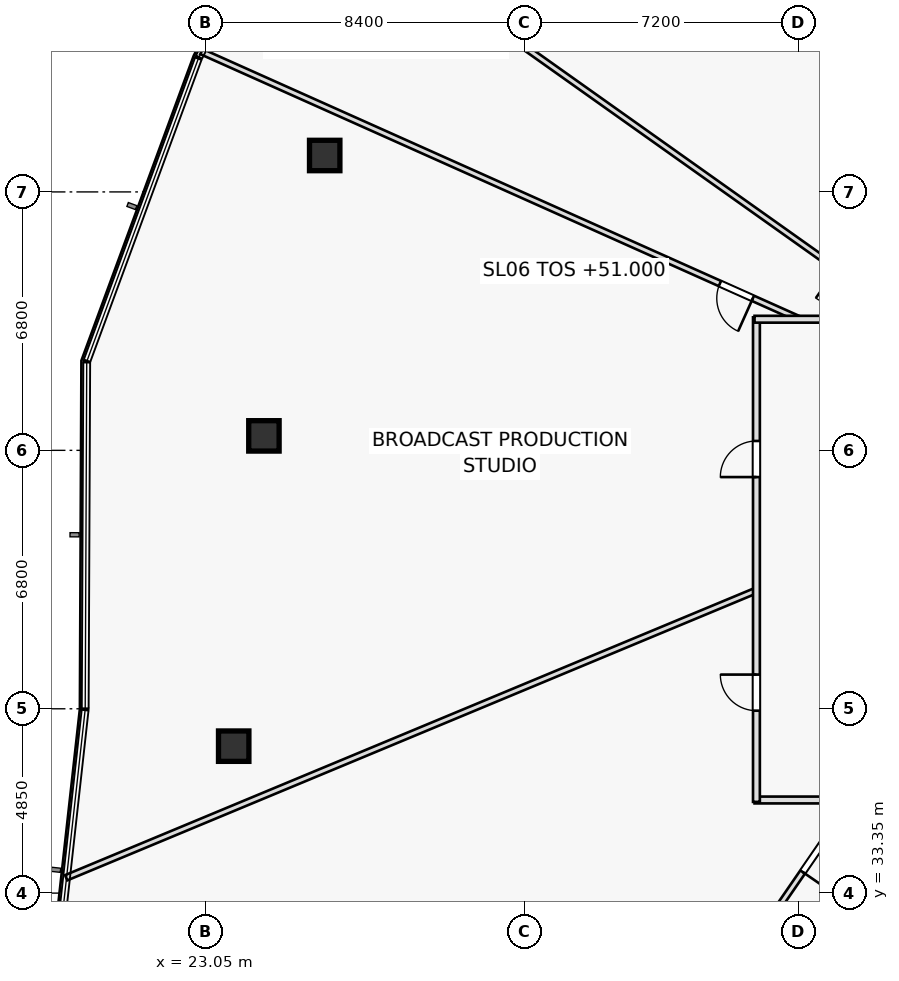
"""IFC4 building model, lengths in metres.
Left out: names, types, materials, properties, quantities, classifications, styles, units other than length and angle.
Written with IfcOpenShell. Run it as: python <this file> out.ifc"""

import sys

from ifc_helpers import new_model, si_unit, direction, frame, frame_2d, origin, origin_2d, place, context, subcontext, project, spatial, rectangle, hollow_rectangle, extrude, element, fill, save


model = new_model("IFC4")
c1 = context("Model", 3, precision=1e-05, world=origin(), true_north=direction((0.0, 1.0)))
c2 = subcontext(c1, "Body", "Model", "MODEL_VIEW")
j1 = project(units=[si_unit("LENGTHUNIT", "METRE"), si_unit("PLANEANGLEUNIT", "RADIAN")], contexts=[c1])
p1 = place(None, origin())
s1 = spatial("IfcSite", under=j1, at=p1, CompositionType="ELEMENT")
p2 = place(p1, origin())
s2 = spatial("IfcBuilding", under=s1, at=p2, CompositionType="ELEMENT")
p3 = place(p2, frame((0.0, 0.0, 51.0)))
s3 = spatial("IfcBuildingStorey", under=s2, at=p3, CompositionType="ELEMENT", Elevation=51.0)
for number, where, z_axis, x_axis in (
    (1, (26.189, 52.758, 0.0), (0.0, 0.0, 1.0), (1.0, 0.0, 0.0)),
    (2, (24.59, 45.381, 0.0), (0.0, 0.0, 1.0), (1.0, 0.0, 0.0)),
    (3, (23.795, 37.216, 0.0), (0.0, 0.0, 1.0), (1.0, 0.0, 0.0)),
):
    element("IfcColumn", number, at=place(p3, frame(where, z_axis=z_axis, x_axis=x_axis)), inside=s3, PredefinedType="COLUMN", context=c2, shape_type="SweptSolid", body=[
        extrude(hollow_rectangle(XDim=0.8, YDim=0.8, WallThickness=0.045, at=origin_2d()), origin(), (0.0, 0.0, 1.0), 3.6),
    ])
p4 = place(p3, frame((41.539, 48.45, 0.0), z_axis=(0.0, 0.0, 1.0), x_axis=(-0.81551552438, 0.578735198079, 0.0)))
e4 = element("IfcWall", 4, at=p4, inside=s3, PredefinedType="PARTITIONING", context=c2, shape_type="SweptSolid", body=[
    extrude(rectangle(XDim=19.961, YDim=0.15, at=frame_2d((9.98, 0.0))), origin(), (0.0, 0.0, 1.0), 2.925),
])
p5 = place(p4, frame((1.35, 0.0, 0.0)))
e5 = element("IfcOpeningElement", 5, at=p5, cuts=e4, PredefinedType="OPENING", context=c2, shape_type="SweptSolid", body=[
    extrude(rectangle(XDim=0.95, YDim=2.05, at=frame_2d((0.475, 1.025))), frame((0.0, 0.085, 0.0), z_axis=(0.0, -1.0, 0.0), x_axis=(1.0, 0.0, 0.0)), (0.0, 0.0, 1.0), 0.17),
])
p6 = place(p3, frame((38.688, 48.45, 0.0), z_axis=(0.0, 0.0, 1.0), x_axis=(-0.912816446659, 0.408370095269, 0.0)))
e6 = element("IfcWall", 6, at=p6, inside=s3, PredefinedType="PARTITIONING", context=c2, shape_type="SweptSolid", body=[
    extrude(rectangle(XDim=17.247, YDim=0.15, at=frame_2d((8.623, 0.0))), origin(), (0.0, 0.0, 1.0), 2.925),
])
p7 = place(p6, frame((1.35, 0.0, 0.0)))
e7 = element("IfcOpeningElement", 7, at=p7, cuts=e6, PredefinedType="OPENING", context=c2, shape_type="SweptSolid", body=[
    extrude(rectangle(XDim=0.95, YDim=2.05, at=frame_2d((0.475, 1.025))), frame((0.0, 0.085, 0.0), z_axis=(0.0, -1.0, 0.0), x_axis=(1.0, 0.0, 0.0)), (0.0, 0.0, 1.0), 0.17),
])
p8 = place(p3, frame((37.55, 41.316, 0.0), z_axis=(0.0, 0.0, 1.0), x_axis=(-0.923195824761, -0.384329896241, 0.0)))
e8 = element("IfcWall", 8, at=p8, inside=s3, PredefinedType="PARTITIONING", context=c2, shape_type="SweptSolid", body=[
    extrude(rectangle(XDim=19.675, YDim=0.15, at=frame_2d((9.838, 0.0))), origin(), (0.0, 0.0, 1.0), 2.925),
])
p9 = place(p3, frame((40.07, 35.8, 0.0), z_axis=(0.0, 0.0, 1.0), x_axis=(-0.566800354016, -0.823855180652, 0.0)))
e9 = element("IfcWall", 9, at=p9, inside=s3, PredefinedType="PARTITIONING", context=c2, shape_type="SweptSolid", body=[
    extrude(rectangle(XDim=16.75, YDim=0.15, at=frame_2d((8.375, 0.0))), origin(), (0.0, 0.0, 1.0), 2.975),
])
p10 = place(p9, frame((1.35, 0.0, 0.0)))
e10 = element("IfcOpeningElement", 10, at=p10, cuts=e9, PredefinedType="OPENING", context=c2, shape_type="SweptSolid", body=[
    extrude(rectangle(XDim=0.95, YDim=2.05, at=frame_2d((0.475, 1.025))), frame((0.0, 0.085, 0.0), z_axis=(0.0, -1.0, 0.0), x_axis=(1.0, 0.0, 0.0)), (0.0, 0.0, 1.0), 0.17),
])
p11 = place(p3, frame((41.795, 35.8, 0.0), z_axis=(0.0, 0.0, 1.0), x_axis=(-0.44763793032, -0.894214897739, 0.0)))
e11 = element("IfcWall", 11, at=p11, inside=s3, PredefinedType="PARTITIONING", context=c2, shape_type="SweptSolid", body=[
    extrude(rectangle(XDim=16.568, YDim=0.15, at=frame_2d((8.284, 0.0))), origin(), (0.0, 0.0, 1.0), 2.975),
])
p12 = place(p3, frame((59.65, 35.8, 0.0), z_axis=(0.0, 0.0, 1.0), x_axis=(-1.0, 0.0, 0.0)))
e12 = element("IfcWall", 12, at=p12, inside=s3, PredefinedType="PARTITIONING", context=c2, shape_type="SweptSolid", body=[
    extrude(rectangle(XDim=22.15, YDim=0.18, at=frame_2d((11.075, 0.0))), origin(), (0.0, 0.0, 1.0), 2.925),
])
p13 = place(p12, frame((2.493, 0.0, 0.0)))
e13 = element("IfcOpeningElement", 13, at=p13, cuts=e12, PredefinedType="OPENING", context=c2, shape_type="SweptSolid", body=[
    extrude(rectangle(XDim=0.95, YDim=2.05, at=frame_2d((0.475, 1.025))), frame((0.0, 0.1, 0.0), z_axis=(0.0, -1.0, 0.0), x_axis=(1.0, 0.0, 0.0)), (0.0, 0.0, 1.0), 0.2),
])
p14 = place(p12, frame((7.588, 0.0, 0.0)))
e14 = element("IfcOpeningElement", 14, at=p14, cuts=e12, PredefinedType="OPENING", context=c2, shape_type="SweptSolid", body=[
    extrude(rectangle(XDim=0.95, YDim=2.05, at=frame_2d((0.475, 1.025))), frame((0.0, 0.1, 0.0), z_axis=(0.0, -1.0, 0.0), x_axis=(1.0, 0.0, 0.0)), (0.0, 0.0, 1.0), 0.2),
])
p15 = place(p12, frame((13.848, 0.0, 0.0)))
e15 = element("IfcOpeningElement", 15, at=p15, cuts=e12, PredefinedType="OPENING", context=c2, shape_type="SweptSolid", body=[
    extrude(rectangle(XDim=0.95, YDim=2.05, at=frame_2d((0.475, 1.025))), frame((0.0, 0.1, 0.0), z_axis=(0.0, -1.0, 0.0), x_axis=(1.0, 0.0, 0.0)), (0.0, 0.0, 1.0), 0.2),
])
p16 = place(p3, frame((37.55, 35.75, 0.0), z_axis=(0.0, 0.0, 1.0), x_axis=(0.0, 1.0, 0.0)))
e16 = element("IfcWall", 16, at=p16, inside=s3, PredefinedType="PARTITIONING", context=c2, shape_type="SweptSolid", body=[
    extrude(rectangle(XDim=12.75, YDim=0.18, at=frame_2d((6.375, 0.0))), origin(), (0.0, 0.0, 1.0), 2.925),
])
p17 = place(p16, frame((2.4, 0.0, 0.0)))
e17 = element("IfcOpeningElement", 17, at=p17, cuts=e16, PredefinedType="OPENING", context=c2, shape_type="SweptSolid", body=[
    extrude(rectangle(XDim=0.95, YDim=2.05, at=frame_2d((0.475, 1.025))), frame((0.0, 0.1, 0.0), z_axis=(0.0, -1.0, 0.0), x_axis=(1.0, 0.0, 0.0)), (0.0, 0.0, 1.0), 0.2),
])
p18 = place(p16, frame((8.547, 0.0, 0.0)))
e18 = element("IfcOpeningElement", 18, at=p18, cuts=e16, PredefinedType="OPENING", context=c2, shape_type="SweptSolid", body=[
    extrude(rectangle(XDim=0.95, YDim=2.05, at=frame_2d((0.475, 1.025))), frame((0.0, 0.1, 0.0), z_axis=(0.0, -1.0, 0.0), x_axis=(1.0, 0.0, 0.0)), (0.0, 0.0, 1.0), 0.2),
])
p19 = place(p3, frame((37.5, 48.45, 0.0), z_axis=(0.0, 0.0, 1.0), x_axis=(1.0, 0.0, 0.0)))
e19 = element("IfcWall", 19, at=p19, inside=s3, PredefinedType="PARTITIONING", context=c2, shape_type="SweptSolid", body=[
    extrude(rectangle(XDim=2.7, YDim=0.18, at=frame_2d((1.35, 0.0))), origin(), (0.0, 0.0, 1.0), 3.6),
])
p20 = place(p7, origin())
e20 = element("IfcDoor", 20, at=p20, inside=s3, OperationType="SINGLE_SWING_LEFT", PredefinedType="DOOR", context=c2, shape_type="SweptSolid", body=[
    extrude(rectangle(XDim=0.95, YDim=2.05, at=frame_2d((0.475, 1.025))), frame((0.0, 0.025, 0.0), z_axis=(0.0, -1.0, 0.0), x_axis=(1.0, 0.0, 0.0)), (0.0, 0.0, 1.0), 0.05),
])
fill(e7, e20)
p21 = place(p10, origin())
e21 = element("IfcDoor", 21, at=p21, inside=s3, OperationType="SINGLE_SWING_RIGHT", PredefinedType="DOOR", context=c2, shape_type="SweptSolid", body=[
    extrude(rectangle(XDim=0.95, YDim=2.05, at=frame_2d((0.475, 1.025))), frame((0.0, 0.025, 0.0), z_axis=(0.0, -1.0, 0.0), x_axis=(1.0, 0.0, 0.0)), (0.0, 0.0, 1.0), 0.05),
])
fill(e10, e21)
p22 = place(p17, origin())
e22 = element("IfcDoor", 22, at=p22, inside=s3, OperationType="SINGLE_SWING_RIGHT", PredefinedType="DOOR", context=c2, shape_type="SweptSolid", body=[
    extrude(rectangle(XDim=0.95, YDim=2.05, at=frame_2d((0.475, 1.025))), frame((0.0, 0.025, 0.0), z_axis=(0.0, -1.0, 0.0), x_axis=(1.0, 0.0, 0.0)), (0.0, 0.0, 1.0), 0.05),
])
fill(e17, e22)
p23 = place(p18, origin())
e23 = element("IfcDoor", 23, at=p23, inside=s3, OperationType="SINGLE_SWING_LEFT", PredefinedType="DOOR", context=c2, shape_type="SweptSolid", body=[
    extrude(rectangle(XDim=0.95, YDim=2.05, at=frame_2d((0.475, 1.025))), frame((0.0, 0.025, 0.0), z_axis=(0.0, -1.0, 0.0), x_axis=(1.0, 0.0, 0.0)), (0.0, 0.0, 1.0), 0.05),
])
fill(e18, e23)
save(model, sys.argv[1])
